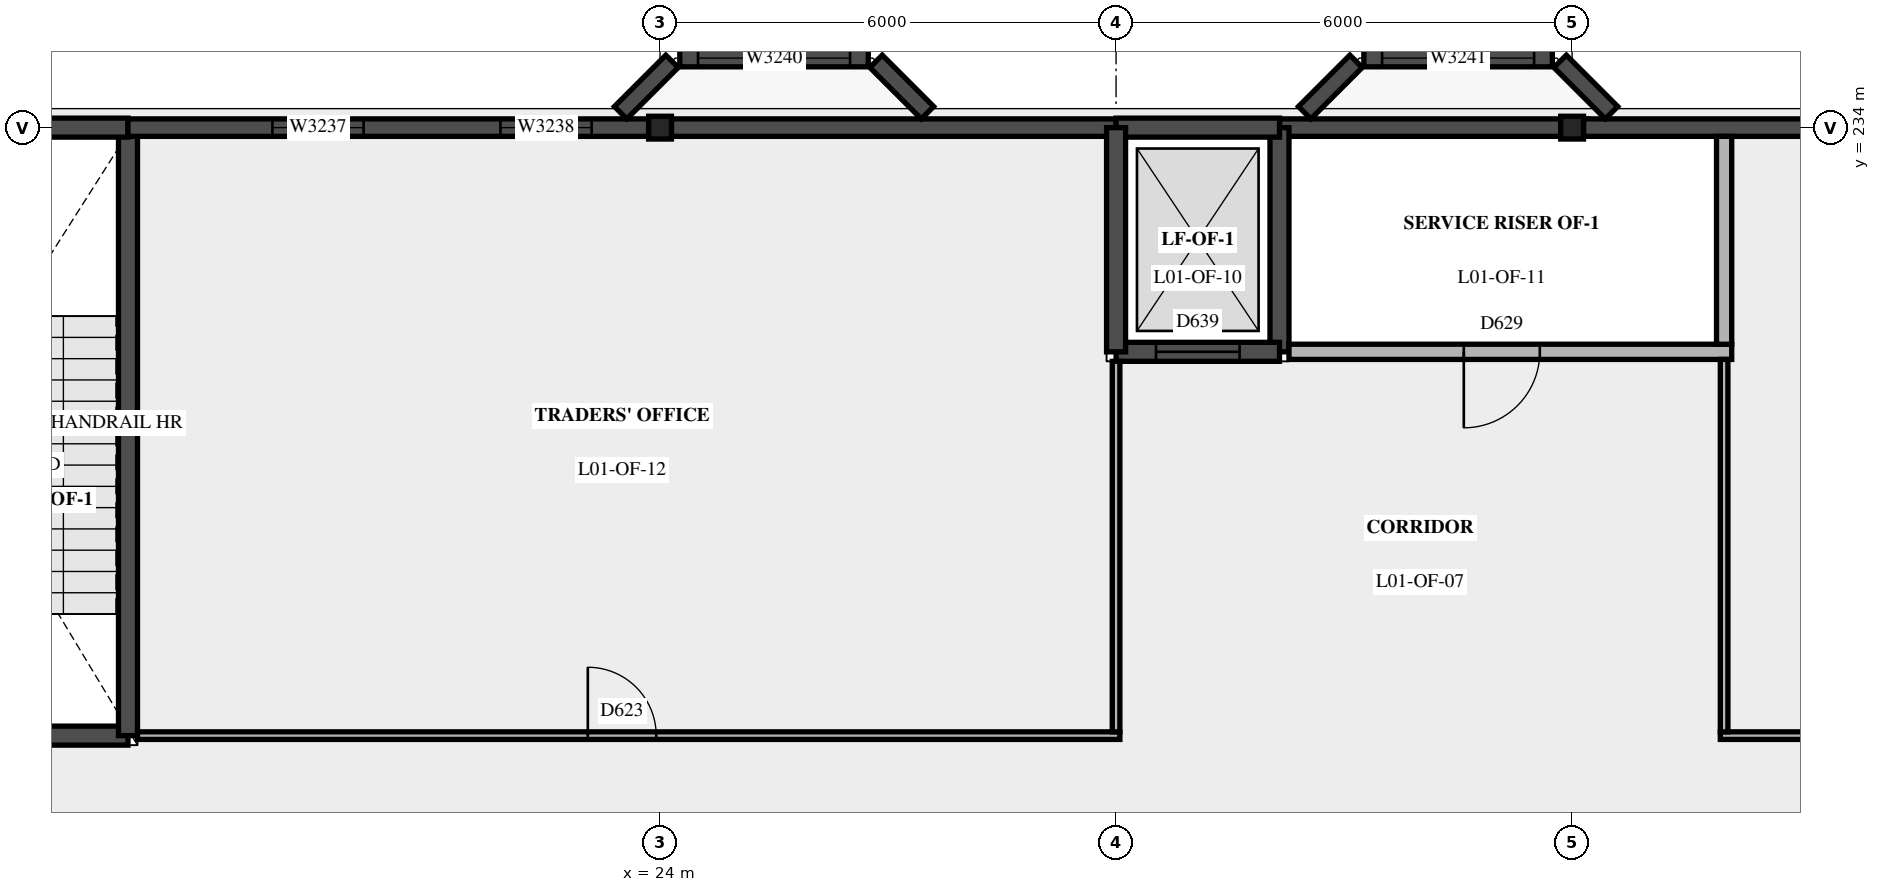
"""IFC4 building model, lengths in metres.
Left out: names, types, materials, properties, quantities, classifications, styles, units other than length and angle.
Written with IfcOpenShell. Run it as: python <this file> out.ifc"""

import sys

from ifc_helpers import new_model, si_unit, direction, frame, frame_2d, origin, origin_2d, place, context, subcontext, project, spatial, rectangle, i_section, extrude, element, fill, save


model = new_model("IFC4")
c1 = context("Model", 3, precision=1e-05, world=origin(), true_north=direction((0.0, 1.0)))
c2 = subcontext(c1, "Body", "Model", "MODEL_VIEW")
j1 = project(units=[si_unit("LENGTHUNIT", "METRE"), si_unit("PLANEANGLEUNIT", "RADIAN")], contexts=[c1])
p1 = place(None, origin())
s1 = spatial("IfcSite", under=j1, at=p1, CompositionType="ELEMENT")
p2 = place(p1, origin())
s2 = spatial("IfcBuilding", under=s1, at=p2, CompositionType="ELEMENT")
p3 = place(p2, frame((0.0, 0.0, 5.4)))
s3 = spatial("IfcBuildingStorey", under=s2, at=p3, CompositionType="ELEMENT", Elevation=5.4)
for number, where, z_axis, x_axis in (
    (1, (24.0, 234.0, 0.0), (0.0, 0.0, 1.0), (1.0, 0.0, 0.0)),
    (2, (36.0, 234.0, 0.0), (0.0, 0.0, 1.0), (1.0, 0.0, 0.0)),
):
    element("IfcColumn", number, at=place(p3, frame(where, z_axis=z_axis, x_axis=x_axis)), inside=s3, PredefinedType="COLUMN", context=c2, shape_type="SweptSolid", body=[
        extrude(i_section(OverallWidth=0.3, OverallDepth=0.3, WebThickness=0.011, FlangeThickness=0.019, at=origin_2d()), origin(), (0.0, 0.0, 1.0), 5.4),
    ])
p4 = place(p3, frame((12.0, 226.0, 0.0), z_axis=(0.0, 0.0, 1.0), x_axis=(1.0, 0.0, 0.0)))
e3 = element("IfcWall", 3, at=p4, inside=s3, PredefinedType="SHEAR", context=c2, shape_type="SweptSolid", body=[
    extrude(rectangle(XDim=5.0, YDim=0.25, at=frame_2d((2.5, 0.0))), origin(), (0.0, 0.0, 1.0), 5.4),
])
p5 = place(p4, frame((2.0, 0.0, 0.0)))
e4 = element("IfcOpeningElement", 4, at=p5, cuts=e3, PredefinedType="OPENING", context=c2, shape_type="SweptSolid", body=[
    extrude(rectangle(XDim=1.0, YDim=2.1, at=frame_2d((0.5, 1.05))), frame((0.0, 0.135, 0.0), z_axis=(0.0, -1.0, 0.0), x_axis=(1.0, 0.0, 0.0)), (0.0, 0.0, 1.0), 0.27),
])
p6 = place(p3, frame((17.0, 226.0, 0.0), z_axis=(0.0, 0.0, 1.0), x_axis=(0.0, 1.0, 0.0)))
e5 = element("IfcWall", 5, at=p6, inside=s3, PredefinedType="SHEAR", context=c2, shape_type="SweptSolid", body=[
    extrude(rectangle(XDim=8.0, YDim=0.25, at=frame_2d((4.0, 0.0))), origin(), (0.0, 0.0, 1.0), 5.4),
])
p7 = place(p3, frame((12.5, 234.0, 0.0), z_axis=(0.0, 0.0, 1.0), x_axis=(1.0, 0.0, 0.0)))
e6 = element("IfcWall", 6, at=p7, inside=s3, PredefinedType="SHEAR", context=c2, shape_type="SweptSolid", body=[
    extrude(rectangle(XDim=4.5, YDim=0.25, at=frame_2d((2.25, 0.0))), origin(), (0.0, 0.0, 1.0), 5.4),
])
p8 = place(p3, frame((17.0, 234.0, 0.0), z_axis=(0.0, 0.0, 1.0), x_axis=(1.0, 0.0, 0.0)))
e7 = element("IfcWall", 7, at=p8, inside=s3, PredefinedType="SOLIDWALL", context=c2, shape_type="SweptSolid", body=[
    extrude(rectangle(XDim=6.85, YDim=0.23, at=frame_2d((3.425, 0.0))), origin(), (0.0, 0.0, 1.0), 5.4),
])
p9 = place(p8, frame((1.9, 0.0, 0.9)))
e8 = element("IfcOpeningElement", 8, at=p9, cuts=e7, PredefinedType="OPENING", context=c2, shape_type="SweptSolid", body=[
    extrude(rectangle(XDim=1.2, YDim=3.3, at=frame_2d((0.6, 1.65))), frame((0.0, 0.125, 0.0), z_axis=(0.0, -1.0, 0.0), x_axis=(1.0, 0.0, 0.0)), (0.0, 0.0, 1.0), 0.25),
])
p10 = place(p8, frame((4.9, 0.0, 0.9)))
e9 = element("IfcOpeningElement", 9, at=p10, cuts=e7, PredefinedType="OPENING", context=c2, shape_type="SweptSolid", body=[
    extrude(rectangle(XDim=1.2, YDim=3.3, at=frame_2d((0.6, 1.65))), frame((0.0, 0.125, 0.0), z_axis=(0.0, -1.0, 0.0), x_axis=(1.0, 0.0, 0.0)), (0.0, 0.0, 1.0), 0.25),
])
p11 = place(p3, frame((24.15, 234.0, 0.0), z_axis=(0.0, 0.0, 1.0), x_axis=(1.0, 0.0, 0.0)))
e10 = element("IfcWall", 10, at=p11, inside=s3, PredefinedType="SOLIDWALL", context=c2, shape_type="SweptSolid", body=[
    extrude(rectangle(XDim=5.85, YDim=0.23, at=frame_2d((2.925, 0.0))), origin(), (0.0, 0.0, 1.0), 5.4),
])
p12 = place(p11, frame((0.35, 0.0, 0.75)))
e11 = element("IfcOpeningElement", 11, at=p12, cuts=e10, PredefinedType="OPENING", context=c2, shape_type="SweptSolid", body=[
    extrude(rectangle(XDim=2.0, YDim=2.55, at=frame_2d((1.0, 1.275))), frame((0.0, 0.125, 0.0), z_axis=(0.0, -1.0, 0.0), x_axis=(1.0, 0.0, 0.0)), (0.0, 0.0, 1.0), 0.25),
])
p13 = place(p3, frame((32.15, 234.0, 0.0), z_axis=(0.0, 0.0, 1.0), x_axis=(1.0, 0.0, 0.0)))
e12 = element("IfcWall", 12, at=p13, inside=s3, PredefinedType="SOLIDWALL", context=c2, shape_type="SweptSolid", body=[
    extrude(rectangle(XDim=3.7, YDim=0.23, at=frame_2d((1.85, 0.0))), origin(), (0.0, 0.0, 1.0), 5.4),
])
p14 = place(p13, frame((1.35, 0.0, 0.75)))
e13 = element("IfcOpeningElement", 13, at=p14, cuts=e12, PredefinedType="OPENING", context=c2, shape_type="SweptSolid", body=[
    extrude(rectangle(XDim=2.0, YDim=2.55, at=frame_2d((1.0, 1.275))), frame((0.0, 0.125, 0.0), z_axis=(0.0, -1.0, 0.0), x_axis=(1.0, 0.0, 0.0)), (0.0, 0.0, 1.0), 0.25),
])
p15 = place(p3, frame((36.15, 234.0, 0.0), z_axis=(0.0, 0.0, 1.0), x_axis=(1.0, 0.0, 0.0)))
e14 = element("IfcWall", 14, at=p15, inside=s3, PredefinedType="SOLIDWALL", context=c2, shape_type="SweptSolid", body=[
    extrude(rectangle(XDim=11.7, YDim=0.23, at=frame_2d((5.85, 0.0))), origin(), (0.0, 0.0, 1.0), 5.4),
])
p16 = place(p15, frame((6.35, 0.0, 0.75)))
e15 = element("IfcOpeningElement", 15, at=p16, cuts=e14, PredefinedType="OPENING", context=c2, shape_type="SweptSolid", body=[
    extrude(rectangle(XDim=2.0, YDim=2.55, at=frame_2d((1.0, 1.275))), frame((0.0, 0.125, 0.0), z_axis=(0.0, -1.0, 0.0), x_axis=(1.0, 0.0, 0.0)), (0.0, 0.0, 1.0), 0.25),
])
p17 = place(p3, frame((23.481, 234.196, 0.75), z_axis=(0.0, 0.0, 1.0), x_axis=(0.707106781187, 0.707106781187, 0.0)))
e16 = element("IfcWall", 16, at=p17, inside=s3, PredefinedType="SOLIDWALL", context=c2, shape_type="SweptSolid", body=[
    extrude(rectangle(XDim=0.956, YDim=0.23, at=frame_2d((0.478, 0.0))), origin(), (0.0, 0.0, 1.0), 2.55),
])
p18 = place(p3, frame((24.26, 234.915, 0.75), z_axis=(0.0, 0.0, 1.0), x_axis=(1.0, 0.0, 0.0)))
e17 = element("IfcWall", 17, at=p18, inside=s3, PredefinedType="SOLIDWALL", context=c2, shape_type="SweptSolid", body=[
    extrude(rectangle(XDim=2.48, YDim=0.23, at=frame_2d((1.24, 0.0))), origin(), (0.0, 0.0, 1.0), 2.55),
])
p19 = place(p18, frame((0.24, 0.0, 0.15)))
e18 = element("IfcOpeningElement", 18, at=p19, cuts=e17, PredefinedType="OPENING", context=c2, shape_type="SweptSolid", body=[
    extrude(rectangle(XDim=2.0, YDim=2.1, at=frame_2d((1.0, 1.05))), frame((0.0, 0.125, 0.0), z_axis=(0.0, -1.0, 0.0), x_axis=(1.0, 0.0, 0.0)), (0.0, 0.0, 1.0), 0.25),
])
p20 = place(p3, frame((26.843, 234.873, 0.75), z_axis=(0.0, 0.0, 1.0), x_axis=(0.707106781187, -0.707106781187, 0.0)))
e19 = element("IfcWall", 19, at=p20, inside=s3, PredefinedType="SOLIDWALL", context=c2, shape_type="SweptSolid", body=[
    extrude(rectangle(XDim=0.956, YDim=0.23, at=frame_2d((0.478, 0.0))), origin(), (0.0, 0.0, 1.0), 2.55),
])
for number, where, z_axis, x_axis in (
    (20, (23.45, 234.195, 0.05), (0.0, 0.0, 1.0), (1.0, 0.0, 0.0)),
    (21, (27.05, 234.195, 0.05), (0.0, 0.0, 1.0), (1.0, 0.0, 0.0)),
):
    element("IfcWall", number, at=place(p3, frame(where, z_axis=z_axis, x_axis=x_axis)), inside=s3, PredefinedType="SOLIDWALL", context=c2, shape_type="SweptSolid", body=[
        extrude(rectangle(XDim=0.5, YDim=0.16, at=frame_2d((0.25, 0.0))), origin(), (0.0, 0.0, 1.0), 0.18),
    ])
for number, where, z_axis, x_axis in (
    (22, (23.45, 234.285, 0.23), (0.0, 0.0, 1.0), (1.0, 0.0, 0.0)),
    (23, (27.05, 234.285, 0.23), (0.0, 0.0, 1.0), (1.0, 0.0, 0.0)),
):
    element("IfcWall", number, at=place(p3, frame(where, z_axis=z_axis, x_axis=x_axis)), inside=s3, PredefinedType="SOLIDWALL", context=c2, shape_type="SweptSolid", body=[
        extrude(rectangle(XDim=0.5, YDim=0.34, at=frame_2d((0.25, 0.0))), origin(), (0.0, 0.0, 1.0), 0.18),
    ])
for number, where, z_axis, x_axis in (
    (24, (23.45, 234.365, 0.41), (0.0, 0.0, 1.0), (1.0, 0.0, 0.0)),
    (25, (27.05, 234.365, 0.41), (0.0, 0.0, 1.0), (1.0, 0.0, 0.0)),
):
    element("IfcWall", number, at=place(p3, frame(where, z_axis=z_axis, x_axis=x_axis)), inside=s3, PredefinedType="SOLIDWALL", context=c2, shape_type="SweptSolid", body=[
        extrude(rectangle(XDim=0.5, YDim=0.5, at=frame_2d((0.25, 0.0))), origin(), (0.0, 0.0, 1.0), 0.18),
    ])
p21 = place(p3, frame((32.481, 234.196, 0.75), z_axis=(0.0, 0.0, 1.0), x_axis=(0.707106781187, 0.707106781187, 0.0)))
e26 = element("IfcWall", 26, at=p21, inside=s3, PredefinedType="SOLIDWALL", context=c2, shape_type="SweptSolid", body=[
    extrude(rectangle(XDim=0.956, YDim=0.23, at=frame_2d((0.478, 0.0))), origin(), (0.0, 0.0, 1.0), 2.55),
])
p22 = place(p3, frame((33.26, 234.915, 0.75), z_axis=(0.0, 0.0, 1.0), x_axis=(1.0, 0.0, 0.0)))
e27 = element("IfcWall", 27, at=p22, inside=s3, PredefinedType="SOLIDWALL", context=c2, shape_type="SweptSolid", body=[
    extrude(rectangle(XDim=2.48, YDim=0.23, at=frame_2d((1.24, 0.0))), origin(), (0.0, 0.0, 1.0), 2.55),
])
p23 = place(p22, frame((0.24, 0.0, 0.15)))
e28 = element("IfcOpeningElement", 28, at=p23, cuts=e27, PredefinedType="OPENING", context=c2, shape_type="SweptSolid", body=[
    extrude(rectangle(XDim=2.0, YDim=2.1, at=frame_2d((1.0, 1.05))), frame((0.0, 0.125, 0.0), z_axis=(0.0, -1.0, 0.0), x_axis=(1.0, 0.0, 0.0)), (0.0, 0.0, 1.0), 0.25),
])
p24 = place(p3, frame((35.843, 234.873, 0.75), z_axis=(0.0, 0.0, 1.0), x_axis=(0.707106781187, -0.707106781187, 0.0)))
e29 = element("IfcWall", 29, at=p24, inside=s3, PredefinedType="SOLIDWALL", context=c2, shape_type="SweptSolid", body=[
    extrude(rectangle(XDim=0.956, YDim=0.23, at=frame_2d((0.478, 0.0))), origin(), (0.0, 0.0, 1.0), 2.55),
])
for number, where, z_axis, x_axis in (
    (30, (32.45, 234.195, 0.05), (0.0, 0.0, 1.0), (1.0, 0.0, 0.0)),
    (31, (36.05, 234.195, 0.05), (0.0, 0.0, 1.0), (1.0, 0.0, 0.0)),
):
    element("IfcWall", number, at=place(p3, frame(where, z_axis=z_axis, x_axis=x_axis)), inside=s3, PredefinedType="SOLIDWALL", context=c2, shape_type="SweptSolid", body=[
        extrude(rectangle(XDim=0.5, YDim=0.16, at=frame_2d((0.25, 0.0))), origin(), (0.0, 0.0, 1.0), 0.18),
    ])
for number, where, z_axis, x_axis in (
    (32, (32.45, 234.285, 0.23), (0.0, 0.0, 1.0), (1.0, 0.0, 0.0)),
    (33, (36.05, 234.285, 0.23), (0.0, 0.0, 1.0), (1.0, 0.0, 0.0)),
):
    element("IfcWall", number, at=place(p3, frame(where, z_axis=z_axis, x_axis=x_axis)), inside=s3, PredefinedType="SOLIDWALL", context=c2, shape_type="SweptSolid", body=[
        extrude(rectangle(XDim=0.5, YDim=0.34, at=frame_2d((0.25, 0.0))), origin(), (0.0, 0.0, 1.0), 0.18),
    ])
for number, where, z_axis, x_axis in (
    (34, (32.45, 234.365, 0.41), (0.0, 0.0, 1.0), (1.0, 0.0, 0.0)),
    (35, (36.05, 234.365, 0.41), (0.0, 0.0, 1.0), (1.0, 0.0, 0.0)),
):
    element("IfcWall", number, at=place(p3, frame(where, z_axis=z_axis, x_axis=x_axis)), inside=s3, PredefinedType="SOLIDWALL", context=c2, shape_type="SweptSolid", body=[
        extrude(rectangle(XDim=0.5, YDim=0.5, at=frame_2d((0.25, 0.0))), origin(), (0.0, 0.0, 1.0), 0.18),
    ])
p25 = place(p3, frame((32.15, 231.05, 0.0), z_axis=(0.0, 0.0, 1.0), x_axis=(0.0, 1.0, 0.0)))
e36 = element("IfcWall", 36, at=p25, inside=s3, PredefinedType="SHEAR", context=c2, shape_type="SweptSolid", body=[
    extrude(rectangle(XDim=2.95, YDim=0.25, at=frame_2d((1.475, 0.0))), origin(), (0.0, 0.0, 1.0), 5.4),
])
p26 = place(p3, frame((32.15, 234.0, 0.0), z_axis=(0.0, 0.0, 1.0), x_axis=(-1.0, 0.0, 0.0)))
e37 = element("IfcWall", 37, at=p26, inside=s3, PredefinedType="SHEAR", context=c2, shape_type="SweptSolid", body=[
    extrude(rectangle(XDim=2.15, YDim=0.25, at=frame_2d((1.075, 0.0))), origin(), (0.0, 0.0, 1.0), 5.4),
])
p27 = place(p3, frame((30.0, 231.05, 0.0), z_axis=(0.0, 0.0, 1.0), x_axis=(1.0, 0.0, 0.0)))
e38 = element("IfcWall", 38, at=p27, inside=s3, PredefinedType="SHEAR", context=c2, shape_type="SweptSolid", body=[
    extrude(rectangle(XDim=2.15, YDim=0.25, at=frame_2d((1.075, 0.0))), origin(), (0.0, 0.0, 1.0), 5.4),
])
p28 = place(p27, frame((0.525, 0.0, 0.0)))
e39 = element("IfcOpeningElement", 39, at=p28, cuts=e38, PredefinedType="OPENING", context=c2, shape_type="SweptSolid", body=[
    extrude(rectangle(XDim=1.1, YDim=2.1, at=frame_2d((0.55, 1.05))), frame((0.0, 0.135, 0.0), z_axis=(0.0, -1.0, 0.0), x_axis=(1.0, 0.0, 0.0)), (0.0, 0.0, 1.0), 0.27),
])
p29 = place(p3, frame((30.0, 234.0, 0.0), z_axis=(0.0, 0.0, 1.0), x_axis=(0.0, -1.0, 0.0)))
e40 = element("IfcWall", 40, at=p29, inside=s3, PredefinedType="SHEAR", context=c2, shape_type="SweptSolid", body=[
    extrude(rectangle(XDim=2.95, YDim=0.25, at=frame_2d((1.475, 0.0))), origin(), (0.0, 0.0, 1.0), 5.4),
])
p30 = place(p3, frame((17.125, 226.0, 0.0), z_axis=(0.0, 0.0, 1.0), x_axis=(1.0, 0.0, 0.0)))
e41 = element("IfcWall", 41, at=p30, inside=s3, PredefinedType="PARTITIONING", context=c2, shape_type="SweptSolid", body=[
    extrude(rectangle(XDim=12.925, YDim=0.1, at=frame_2d((6.462, 0.0))), origin(), (0.0, 0.0, 1.0), 4.7),
])
p31 = place(p30, frame((5.925, 0.0, 0.0)))
e42 = element("IfcOpeningElement", 42, at=p31, cuts=e41, PredefinedType="OPENING", context=c2, shape_type="SweptSolid", body=[
    extrude(rectangle(XDim=0.9, YDim=2.1, at=frame_2d((0.45, 1.05))), frame((0.0, 0.06, 0.0), z_axis=(0.0, -1.0, 0.0), x_axis=(1.0, 0.0, 0.0)), (0.0, 0.0, 1.0), 0.12),
])
p32 = place(p3, frame((37.95, 226.0, 0.0), z_axis=(0.0, 0.0, 1.0), x_axis=(1.0, 0.0, 0.0)))
e43 = element("IfcWall", 43, at=p32, inside=s3, PredefinedType="PARTITIONING", context=c2, shape_type="SweptSolid", body=[
    extrude(rectangle(XDim=16.925, YDim=0.1, at=frame_2d((8.462, 0.0))), origin(), (0.0, 0.0, 1.0), 4.7),
])
p33 = place(p32, frame((7.15, 0.0, 0.0)))
e44 = element("IfcOpeningElement", 44, at=p33, cuts=e43, PredefinedType="OPENING", context=c2, shape_type="SweptSolid", body=[
    extrude(rectangle(XDim=1.8, YDim=2.1, at=frame_2d((0.9, 1.05))), frame((0.0, 0.06, 0.0), z_axis=(0.0, -1.0, 0.0), x_axis=(1.0, 0.0, 0.0)), (0.0, 0.0, 1.0), 0.12),
])
p34 = place(p3, frame((32.275, 231.05, 0.0), z_axis=(0.0, 0.0, 1.0), x_axis=(1.0, 0.0, 0.0)))
e45 = element("IfcWall", 45, at=p34, inside=s3, PredefinedType="PARTITIONING", context=c2, shape_type="SweptSolid", body=[
    extrude(rectangle(XDim=5.825, YDim=0.2, at=frame_2d((2.913, 0.0))), origin(), (0.0, 0.0, 1.0), 4.7),
])
p35 = place(p34, frame((2.3, 0.0, 0.0)))
e46 = element("IfcOpeningElement", 46, at=p35, cuts=e45, PredefinedType="OPENING", context=c2, shape_type="SweptSolid", body=[
    extrude(rectangle(XDim=1.0, YDim=2.1, at=frame_2d((0.5, 1.05))), frame((0.0, 0.11, 0.0), z_axis=(0.0, -1.0, 0.0), x_axis=(1.0, 0.0, 0.0)), (0.0, 0.0, 1.0), 0.22),
])
p36 = place(p3, frame((30.0, 226.05, 0.0), z_axis=(0.0, 0.0, 1.0), x_axis=(0.0, 1.0, 0.0)))
e47 = element("IfcWall", 47, at=p36, inside=s3, PredefinedType="PARTITIONING", context=c2, shape_type="SweptSolid", body=[
    extrude(rectangle(XDim=4.875, YDim=0.1, at=frame_2d((2.438, 0.0))), origin(), (0.0, 0.0, 1.0), 5.15),
])
p37 = place(p3, frame((38.0, 226.05, 0.0), z_axis=(0.0, 0.0, 1.0), x_axis=(0.0, 1.0, 0.0)))
e48 = element("IfcWall", 48, at=p37, inside=s3, PredefinedType="PARTITIONING", context=c2, shape_type="SweptSolid", body=[
    extrude(rectangle(XDim=4.9, YDim=0.1, at=frame_2d((2.45, 0.0))), origin(), (0.0, 0.0, 1.0), 5.15),
])
p38 = place(p3, frame((38.0, 231.15, 0.0), z_axis=(0.0, 0.0, 1.0), x_axis=(0.0, 1.0, 0.0)))
e49 = element("IfcWall", 49, at=p38, inside=s3, PredefinedType="PARTITIONING", context=c2, shape_type="SweptSolid", body=[
    extrude(rectangle(XDim=2.735, YDim=0.2, at=frame_2d((1.368, 0.0))), origin(), (0.0, 0.0, 1.0), 5.15),
])
p39 = place(p9, origin())
e50 = element("IfcWindow", 50, at=p39, inside=s3, PartitioningType="SINGLE_PANEL", PredefinedType="WINDOW", context=c2, shape_type="SweptSolid", body=[
    extrude(rectangle(XDim=1.2, YDim=3.3, at=frame_2d((0.6, 1.65))), frame((0.0, 0.03, 0.0), z_axis=(0.0, -1.0, 0.0), x_axis=(1.0, 0.0, 0.0)), (0.0, 0.0, 1.0), 0.06),
])
fill(e8, e50)
p40 = place(p10, origin())
e51 = element("IfcWindow", 51, at=p40, inside=s3, PartitioningType="SINGLE_PANEL", PredefinedType="WINDOW", context=c2, shape_type="SweptSolid", body=[
    extrude(rectangle(XDim=1.2, YDim=3.3, at=frame_2d((0.6, 1.65))), frame((0.0, 0.03, 0.0), z_axis=(0.0, -1.0, 0.0), x_axis=(1.0, 0.0, 0.0)), (0.0, 0.0, 1.0), 0.06),
])
fill(e9, e51)
p41 = place(p19, origin())
e52 = element("IfcWindow", 52, at=p41, inside=s3, PartitioningType="SINGLE_PANEL", PredefinedType="WINDOW", context=c2, shape_type="SweptSolid", body=[
    extrude(rectangle(XDim=2.0, YDim=2.1, at=frame_2d((1.0, 1.05))), frame((0.0, 0.03, 0.0), z_axis=(0.0, -1.0, 0.0), x_axis=(1.0, 0.0, 0.0)), (0.0, 0.0, 1.0), 0.06),
])
fill(e18, e52)
p42 = place(p23, origin())
e53 = element("IfcWindow", 53, at=p42, inside=s3, PartitioningType="SINGLE_PANEL", PredefinedType="WINDOW", context=c2, shape_type="SweptSolid", body=[
    extrude(rectangle(XDim=2.0, YDim=2.1, at=frame_2d((1.0, 1.05))), frame((0.0, 0.03, 0.0), z_axis=(0.0, -1.0, 0.0), x_axis=(1.0, 0.0, 0.0)), (0.0, 0.0, 1.0), 0.06),
])
fill(e28, e53)
p43 = place(p28, origin())
e54 = element("IfcDoor", 54, at=p43, inside=s3, OperationType="SLIDING_TO_LEFT", PredefinedType="DOOR", context=c2, shape_type="SweptSolid", body=[
    extrude(rectangle(XDim=1.1, YDim=2.1, at=frame_2d((0.55, 1.05))), frame((0.0, 0.025, 0.0), z_axis=(0.0, -1.0, 0.0), x_axis=(1.0, 0.0, 0.0)), (0.0, 0.0, 1.0), 0.05),
])
fill(e39, e54)
p44 = place(p31, origin())
e55 = element("IfcDoor", 55, at=p44, inside=s3, OperationType="SINGLE_SWING_LEFT", PredefinedType="DOOR", context=c2, shape_type="SweptSolid", body=[
    extrude(rectangle(XDim=0.9, YDim=2.1, at=frame_2d((0.45, 1.05))), frame((0.0, 0.025, 0.0), z_axis=(0.0, -1.0, 0.0), x_axis=(1.0, 0.0, 0.0)), (0.0, 0.0, 1.0), 0.05),
])
fill(e42, e55)
p45 = place(p35, origin())
e56 = element("IfcDoor", 56, at=p45, inside=s3, OperationType="SINGLE_SWING_RIGHT", PredefinedType="DOOR", context=c2, shape_type="SweptSolid", body=[
    extrude(rectangle(XDim=1.0, YDim=2.1, at=frame_2d((0.5, 1.05))), frame((0.0, 0.025, 0.0), z_axis=(0.0, -1.0, 0.0), x_axis=(1.0, 0.0, 0.0)), (0.0, 0.0, 1.0), 0.05),
])
fill(e46, e56)
save(model, sys.argv[1])
